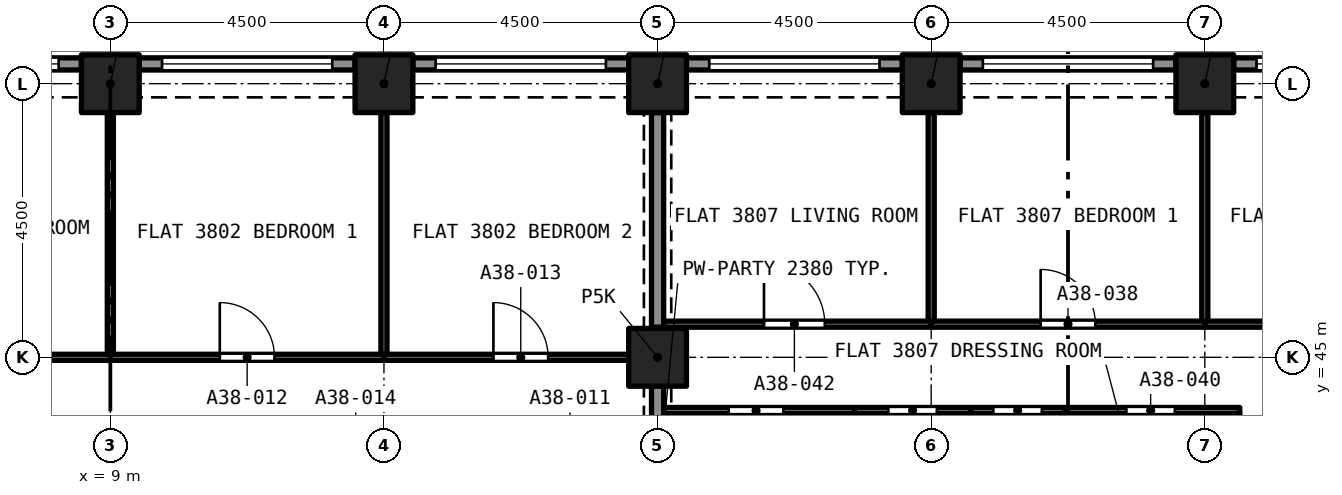
"""IFC4 building model, lengths in metres.
Left out: names, types, materials, properties, quantities, classifications, styles, units other than length and angle.
Written with IfcOpenShell. Run it as: python <this file> out.ifc"""

import sys

from ifc_helpers import new_model, si_unit, direction, frame, frame_2d, origin, origin_2d, place, context, subcontext, project, spatial, rectangle, extrude, element, fill, save


model = new_model("IFC4")
c1 = context("Model", 3, precision=1e-05, world=origin(), true_north=direction((0.0, 1.0)))
c2 = subcontext(c1, "Body", "Model", "MODEL_VIEW")
j1 = project(units=[si_unit("LENGTHUNIT", "METRE"), si_unit("PLANEANGLEUNIT", "RADIAN")], contexts=[c1])
p1 = place(None, origin())
s1 = spatial("IfcSite", under=j1, at=p1, CompositionType="ELEMENT")
p2 = place(p1, origin())
s2 = spatial("IfcBuilding", under=s1, at=p2, CompositionType="ELEMENT")
p3 = place(p2, frame((0.0, 0.0, 136.6)))
s3 = spatial("IfcBuildingStorey", under=s2, at=p3, CompositionType="ELEMENT", Elevation=136.6)
for number, where, z_axis, x_axis in (
    (1, (18.0, 45.0, 0.0), (0.0, 0.0, 1.0), (1.0, 0.0, 0.0)),
    (2, (9.0, 49.5, 0.0), (0.0, 0.0, 1.0), (1.0, 0.0, 0.0)),
    (3, (13.5, 49.5, 0.0), (0.0, 0.0, 1.0), (1.0, 0.0, 0.0)),
    (4, (18.0, 49.5, 0.0), (0.0, 0.0, 1.0), (1.0, 0.0, 0.0)),
    (5, (22.5, 49.5, 0.0), (0.0, 0.0, 1.0), (1.0, 0.0, 0.0)),
    (6, (27.0, 49.5, 0.0), (0.0, 0.0, 1.0), (1.0, 0.0, 0.0)),
):
    element("IfcColumn", number, at=place(p3, frame(where, z_axis=z_axis, x_axis=x_axis)), inside=s3, PredefinedType="COLUMN", context=c2, shape_type="SweptSolid", body=[
        extrude(rectangle(XDim=0.95, YDim=0.95, at=origin_2d()), origin(), (0.0, 0.0, 1.0), 3.2),
    ])
p4 = place(p3, frame((27.475, 49.825, 0.0), z_axis=(0.0, 0.0, 1.0), x_axis=(1.0, 0.0, 0.0)))
e7 = element("IfcWall", 7, at=p4, inside=s3, PredefinedType="SOLIDWALL", context=c2, shape_type="SweptSolid", body=[
    extrude(rectangle(XDim=3.55, YDim=0.2, at=frame_2d((1.775, 0.0))), origin(), (0.0, 0.0, 1.0), 3.2),
])
p5 = place(p4, frame((0.375, 0.0, 0.45)))
e8 = element("IfcOpeningElement", 8, at=p5, cuts=e7, PredefinedType="OPENING", context=c2, shape_type="SweptSolid", body=[
    extrude(rectangle(XDim=2.8, YDim=1.95, at=frame_2d((1.4, 0.975))), frame((0.0, 0.11, 0.0), z_axis=(0.0, -1.0, 0.0), x_axis=(1.0, 0.0, 0.0)), (0.0, 0.0, 1.0), 0.22),
])
p6 = place(p3, frame((22.975, 49.825, 0.0), z_axis=(0.0, 0.0, 1.0), x_axis=(1.0, 0.0, 0.0)))
e9 = element("IfcWall", 9, at=p6, inside=s3, PredefinedType="SOLIDWALL", context=c2, shape_type="SweptSolid", body=[
    extrude(rectangle(XDim=3.55, YDim=0.2, at=frame_2d((1.775, 0.0))), origin(), (0.0, 0.0, 1.0), 3.2),
])
p7 = place(p6, frame((0.375, 0.0, 0.45)))
e10 = element("IfcOpeningElement", 10, at=p7, cuts=e9, PredefinedType="OPENING", context=c2, shape_type="SweptSolid", body=[
    extrude(rectangle(XDim=2.8, YDim=1.95, at=frame_2d((1.4, 0.975))), frame((0.0, 0.11, 0.0), z_axis=(0.0, -1.0, 0.0), x_axis=(1.0, 0.0, 0.0)), (0.0, 0.0, 1.0), 0.22),
])
p8 = place(p3, frame((18.475, 49.825, 0.0), z_axis=(0.0, 0.0, 1.0), x_axis=(1.0, 0.0, 0.0)))
e11 = element("IfcWall", 11, at=p8, inside=s3, PredefinedType="SOLIDWALL", context=c2, shape_type="SweptSolid", body=[
    extrude(rectangle(XDim=3.55, YDim=0.2, at=frame_2d((1.775, 0.0))), origin(), (0.0, 0.0, 1.0), 3.2),
])
p9 = place(p8, frame((0.375, 0.0, 0.45)))
e12 = element("IfcOpeningElement", 12, at=p9, cuts=e11, PredefinedType="OPENING", context=c2, shape_type="SweptSolid", body=[
    extrude(rectangle(XDim=2.8, YDim=1.95, at=frame_2d((1.4, 0.975))), frame((0.0, 0.11, 0.0), z_axis=(0.0, -1.0, 0.0), x_axis=(1.0, 0.0, 0.0)), (0.0, 0.0, 1.0), 0.22),
])
p10 = place(p3, frame((13.975, 49.825, 0.0), z_axis=(0.0, 0.0, 1.0), x_axis=(1.0, 0.0, 0.0)))
e13 = element("IfcWall", 13, at=p10, inside=s3, PredefinedType="SOLIDWALL", context=c2, shape_type="SweptSolid", body=[
    extrude(rectangle(XDim=3.55, YDim=0.2, at=frame_2d((1.775, 0.0))), origin(), (0.0, 0.0, 1.0), 3.2),
])
p11 = place(p10, frame((0.375, 0.0, 0.45)))
e14 = element("IfcOpeningElement", 14, at=p11, cuts=e13, PredefinedType="OPENING", context=c2, shape_type="SweptSolid", body=[
    extrude(rectangle(XDim=2.8, YDim=1.95, at=frame_2d((1.4, 0.975))), frame((0.0, 0.11, 0.0), z_axis=(0.0, -1.0, 0.0), x_axis=(1.0, 0.0, 0.0)), (0.0, 0.0, 1.0), 0.22),
])
p12 = place(p3, frame((9.475, 49.825, 0.0), z_axis=(0.0, 0.0, 1.0), x_axis=(1.0, 0.0, 0.0)))
e15 = element("IfcWall", 15, at=p12, inside=s3, PredefinedType="SOLIDWALL", context=c2, shape_type="SweptSolid", body=[
    extrude(rectangle(XDim=3.55, YDim=0.2, at=frame_2d((1.775, 0.0))), origin(), (0.0, 0.0, 1.0), 3.2),
])
p13 = place(p12, frame((0.375, 0.0, 0.45)))
e16 = element("IfcOpeningElement", 16, at=p13, cuts=e15, PredefinedType="OPENING", context=c2, shape_type="SweptSolid", body=[
    extrude(rectangle(XDim=2.8, YDim=1.95, at=frame_2d((1.4, 0.975))), frame((0.0, 0.11, 0.0), z_axis=(0.0, -1.0, 0.0), x_axis=(1.0, 0.0, 0.0)), (0.0, 0.0, 1.0), 0.22),
])
p14 = place(p3, frame((4.975, 49.825, 0.0), z_axis=(0.0, 0.0, 1.0), x_axis=(1.0, 0.0, 0.0)))
e17 = element("IfcWall", 17, at=p14, inside=s3, PredefinedType="SOLIDWALL", context=c2, shape_type="SweptSolid", body=[
    extrude(rectangle(XDim=3.55, YDim=0.2, at=frame_2d((1.775, 0.0))), origin(), (0.0, 0.0, 1.0), 3.2),
])
p15 = place(p14, frame((0.375, 0.0, 0.45)))
e18 = element("IfcOpeningElement", 18, at=p15, cuts=e17, PredefinedType="OPENING", context=c2, shape_type="SweptSolid", body=[
    extrude(rectangle(XDim=2.8, YDim=1.95, at=frame_2d((1.4, 0.975))), frame((0.0, 0.11, 0.0), z_axis=(0.0, -1.0, 0.0), x_axis=(1.0, 0.0, 0.0)), (0.0, 0.0, 1.0), 0.22),
])
p16 = place(p3, frame((18.0, 40.975, 0.0), z_axis=(0.0, 0.0, 1.0), x_axis=(0.0, 1.0, 0.0)))
e19 = element("IfcWall", 19, at=p16, inside=s3, PredefinedType="PARTITIONING", context=c2, shape_type="SweptSolid", body=[
    extrude(rectangle(XDim=3.55, YDim=0.2, at=frame_2d((1.775, 0.0))), origin(), (0.0, 0.0, 1.0), 2.38),
])
p17 = place(p3, frame((13.5, 45.05, 0.0), z_axis=(0.0, 0.0, 1.0), x_axis=(0.0, 1.0, 0.0)))
e20 = element("IfcWall", 20, at=p17, inside=s3, PredefinedType="PARTITIONING", context=c2, shape_type="SweptSolid", body=[
    extrude(rectangle(XDim=3.975, YDim=0.1, at=frame_2d((1.987, 0.0))), origin(), (0.0, 0.0, 1.0), 2.9),
])
p18 = place(p3, frame((9.0, 45.0, 0.0), z_axis=(0.0, 0.0, 1.0), x_axis=(1.0, 0.0, 0.0)))
e21 = element("IfcWall", 21, at=p18, inside=s3, PredefinedType="PARTITIONING", context=c2, shape_type="SweptSolid", body=[
    extrude(rectangle(XDim=4.5, YDim=0.1, at=frame_2d((2.25, 0.0))), origin(), (0.0, 0.0, 1.0), 2.9),
])
p19 = place(p18, frame((1.8, 0.0, 0.0)))
e22 = element("IfcOpeningElement", 22, at=p19, cuts=e21, PredefinedType="OPENING", context=c2, shape_type="SweptSolid", body=[
    extrude(rectangle(XDim=0.9, YDim=2.1, at=frame_2d((0.45, 1.05))), frame((0.0, 0.06, 0.0), z_axis=(0.0, -1.0, 0.0), x_axis=(1.0, 0.0, 0.0)), (0.0, 0.0, 1.0), 0.12),
])
p20 = place(p3, frame((9.0, 45.05, 0.0), z_axis=(0.0, 0.0, 1.0), x_axis=(0.0, 1.0, 0.0)))
e23 = element("IfcWall", 23, at=p20, inside=s3, PredefinedType="PARTITIONING", context=c2, shape_type="SweptSolid", body=[
    extrude(rectangle(XDim=3.975, YDim=0.1, at=frame_2d((1.987, 0.0))), origin(), (0.0, 0.0, 1.0), 2.9),
])
p21 = place(p3, frame((13.5, 45.0, 0.0), z_axis=(0.0, 0.0, 1.0), x_axis=(1.0, 0.0, 0.0)))
e24 = element("IfcWall", 24, at=p21, inside=s3, PredefinedType="PARTITIONING", context=c2, shape_type="SweptSolid", body=[
    extrude(rectangle(XDim=4.025, YDim=0.1, at=frame_2d((2.012, 0.0))), origin(), (0.0, 0.0, 1.0), 2.9),
])
p22 = place(p21, frame((1.8, 0.0, 0.0)))
e25 = element("IfcOpeningElement", 25, at=p22, cuts=e24, PredefinedType="OPENING", context=c2, shape_type="SweptSolid", body=[
    extrude(rectangle(XDim=0.9, YDim=2.1, at=frame_2d((0.45, 1.05))), frame((0.0, 0.06, 0.0), z_axis=(0.0, -1.0, 0.0), x_axis=(1.0, 0.0, 0.0)), (0.0, 0.0, 1.0), 0.12),
])
p23 = place(p3, frame((18.0, 45.495, 0.0), z_axis=(0.0, 0.0, 1.0), x_axis=(0.0, 1.0, 0.0)))
e26 = element("IfcWall", 26, at=p23, inside=s3, PredefinedType="PARTITIONING", context=c2, shape_type="SweptSolid", body=[
    extrude(rectangle(XDim=3.53, YDim=0.2, at=frame_2d((1.765, 0.0))), origin(), (0.0, 0.0, 1.0), 2.38),
])
p24 = place(p3, frame((0.514, 45.0, 0.0), z_axis=(0.0, 0.0, 1.0), x_axis=(1.0, 0.0, 0.0)))
e27 = element("IfcWall", 27, at=p24, inside=s3, PredefinedType="PARTITIONING", context=c2, shape_type="SweptSolid", body=[
    extrude(rectangle(XDim=8.486, YDim=0.1, at=frame_2d((4.243, 0.0))), origin(), (0.0, 0.0, 1.0), 2.9),
])
p25 = place(p24, frame((3.423, 0.0, 0.0)))
e28 = element("IfcOpeningElement", 28, at=p25, cuts=e27, PredefinedType="OPENING", context=c2, shape_type="SweptSolid", body=[
    extrude(rectangle(XDim=1.6, YDim=2.1, at=frame_2d((0.8, 1.05))), frame((0.0, 0.06, 0.0), z_axis=(0.0, -1.0, 0.0), x_axis=(1.0, 0.0, 0.0)), (0.0, 0.0, 1.0), 0.12),
])
p26 = place(p3, frame((27.0, 45.595, 0.0), z_axis=(0.0, 0.0, 1.0), x_axis=(0.0, 1.0, 0.0)))
e29 = element("IfcWall", 29, at=p26, inside=s3, PredefinedType="PARTITIONING", context=c2, shape_type="SweptSolid", body=[
    extrude(rectangle(XDim=3.43, YDim=0.1, at=frame_2d((1.715, 0.0))), origin(), (0.0, 0.0, 1.0), 2.75),
])
p27 = place(p3, frame((22.5, 45.545, 0.0), z_axis=(0.0, 0.0, 1.0), x_axis=(1.0, 0.0, 0.0)))
e30 = element("IfcWall", 30, at=p27, inside=s3, PredefinedType="PARTITIONING", context=c2, shape_type="SweptSolid", body=[
    extrude(rectangle(XDim=4.5, YDim=0.1, at=frame_2d((2.25, 0.0))), origin(), (0.0, 0.0, 1.0), 2.75),
])
p28 = place(p27, frame((1.8, 0.0, 0.0)))
e31 = element("IfcOpeningElement", 31, at=p28, cuts=e30, PredefinedType="OPENING", context=c2, shape_type="SweptSolid", body=[
    extrude(rectangle(XDim=0.9, YDim=2.1, at=frame_2d((0.45, 1.05))), frame((0.0, 0.06, 0.0), z_axis=(0.0, -1.0, 0.0), x_axis=(1.0, 0.0, 0.0)), (0.0, 0.0, 1.0), 0.12),
])
p29 = place(p3, frame((22.5, 45.595, 0.0), z_axis=(0.0, 0.0, 1.0), x_axis=(0.0, 1.0, 0.0)))
e32 = element("IfcWall", 32, at=p29, inside=s3, PredefinedType="PARTITIONING", context=c2, shape_type="SweptSolid", body=[
    extrude(rectangle(XDim=3.43, YDim=0.1, at=frame_2d((1.715, 0.0))), origin(), (0.0, 0.0, 1.0), 2.75),
])
p30 = place(p3, frame((27.0, 45.545, 0.0), z_axis=(0.0, 0.0, 1.0), x_axis=(1.0, 0.0, 0.0)))
e33 = element("IfcWall", 33, at=p30, inside=s3, PredefinedType="PARTITIONING", context=c2, shape_type="SweptSolid", body=[
    extrude(rectangle(XDim=4.4, YDim=0.1, at=frame_2d((2.2, 0.0))), origin(), (0.0, 0.0, 1.0), 2.75),
])
p31 = place(p30, frame((1.8, 0.0, 0.0)))
e34 = element("IfcOpeningElement", 34, at=p31, cuts=e33, PredefinedType="OPENING", context=c2, shape_type="SweptSolid", body=[
    extrude(rectangle(XDim=0.9, YDim=2.1, at=frame_2d((0.45, 1.05))), frame((0.0, 0.06, 0.0), z_axis=(0.0, -1.0, 0.0), x_axis=(1.0, 0.0, 0.0)), (0.0, 0.0, 1.0), 0.12),
])
p32 = place(p3, frame((27.575, 44.125, 0.0), z_axis=(0.0, 0.0, 1.0), x_axis=(-1.0, 0.0, 0.0)))
e35 = element("IfcWall", 35, at=p32, inside=s3, PredefinedType="PARTITIONING", context=c2, shape_type="SweptSolid", body=[
    extrude(rectangle(XDim=2.881, YDim=0.1, at=frame_2d((1.44, 0.0))), origin(), (0.0, 0.0, 1.0), 2.75),
])
p33 = place(p32, frame((1.066, 0.0, 0.0)))
e36 = element("IfcOpeningElement", 36, at=p33, cuts=e35, PredefinedType="OPENING", context=c2, shape_type="SweptSolid", body=[
    extrude(rectangle(XDim=0.8, YDim=2.1, at=frame_2d((0.4, 1.05))), frame((0.0, 0.06, 0.0), z_axis=(0.0, -1.0, 0.0), x_axis=(1.0, 0.0, 0.0)), (0.0, 0.0, 1.0), 0.12),
])
for number, where, z_axis, x_axis in (
    (37, (27.525, 40.1, 0.0), (0.0, 0.0, 1.0), (0.0, 1.0, 0.0)),
    (38, (24.694, 40.1, 0.0), (0.0, 0.0, 1.0), (0.0, 1.0, 0.0)),
):
    element("IfcWall", number, at=place(p3, frame(where, z_axis=z_axis, x_axis=x_axis)), inside=s3, PredefinedType="PARTITIONING", context=c2, shape_type="SweptSolid", body=[
        extrude(rectangle(XDim=3.975, YDim=0.1, at=frame_2d((1.987, 0.0))), origin(), (0.0, 0.0, 1.0), 2.75),
    ])
p34 = place(p3, frame((21.24, 44.125, 0.0), z_axis=(0.0, 0.0, 1.0), x_axis=(-1.0, 0.0, 0.0)))
e39 = element("IfcWall", 39, at=p34, inside=s3, PredefinedType="PARTITIONING", context=c2, shape_type="SweptSolid", body=[
    extrude(rectangle(XDim=3.14, YDim=0.1, at=frame_2d((1.57, 0.0))), origin(), (0.0, 0.0, 1.0), 2.75),
])
p35 = place(p34, frame((1.17, 0.0, 0.0)))
e40 = element("IfcOpeningElement", 40, at=p35, cuts=e39, PredefinedType="OPENING", context=c2, shape_type="SweptSolid", body=[
    extrude(rectangle(XDim=0.9, YDim=2.1, at=frame_2d((0.45, 1.05))), frame((0.0, 0.06, 0.0), z_axis=(0.0, -1.0, 0.0), x_axis=(1.0, 0.0, 0.0)), (0.0, 0.0, 1.0), 0.12),
])
p36 = place(p3, frame((18.1, 45.545, 0.0), z_axis=(0.0, 0.0, 1.0), x_axis=(1.0, 0.0, 0.0)))
e41 = element("IfcWall", 41, at=p36, inside=s3, PredefinedType="PARTITIONING", context=c2, shape_type="SweptSolid", body=[
    extrude(rectangle(XDim=4.4, YDim=0.1, at=frame_2d((2.2, 0.0))), origin(), (0.0, 0.0, 1.0), 2.75),
])
p37 = place(p36, frame((1.65, 0.0, 0.0)))
e42 = element("IfcOpeningElement", 42, at=p37, cuts=e41, PredefinedType="OPENING", context=c2, shape_type="SweptSolid", body=[
    extrude(rectangle(XDim=1.0, YDim=2.1, at=frame_2d((0.5, 1.05))), frame((0.0, 0.06, 0.0), z_axis=(0.0, -1.0, 0.0), x_axis=(1.0, 0.0, 0.0)), (0.0, 0.0, 1.0), 0.12),
])
p38 = place(p3, frame((24.694, 44.125, 0.0), z_axis=(0.0, 0.0, 1.0), x_axis=(-1.0, 0.0, 0.0)))
e43 = element("IfcWall", 43, at=p38, inside=s3, PredefinedType="PARTITIONING", context=c2, shape_type="SweptSolid", body=[
    extrude(rectangle(XDim=1.544, YDim=0.1, at=frame_2d((0.772, 0.0))), origin(), (0.0, 0.0, 1.0), 2.75),
])
p39 = place(p38, frame((0.372, 0.0, 0.0)))
e44 = element("IfcOpeningElement", 44, at=p39, cuts=e43, PredefinedType="OPENING", context=c2, shape_type="SweptSolid", body=[
    extrude(rectangle(XDim=0.8, YDim=2.1, at=frame_2d((0.4, 1.05))), frame((0.0, 0.06, 0.0), z_axis=(0.0, -1.0, 0.0), x_axis=(1.0, 0.0, 0.0)), (0.0, 0.0, 1.0), 0.12),
])
p40 = place(p3, frame((23.15, 44.125, 0.0), z_axis=(0.0, 0.0, 1.0), x_axis=(-1.0, 0.0, 0.0)))
e45 = element("IfcWall", 45, at=p40, inside=s3, PredefinedType="PARTITIONING", context=c2, shape_type="SweptSolid", body=[
    extrude(rectangle(XDim=1.91, YDim=0.1, at=frame_2d((0.955, 0.0))), origin(), (0.0, 0.0, 1.0), 2.75),
])
p41 = place(p40, frame((0.555, 0.0, 0.0)))
e46 = element("IfcOpeningElement", 46, at=p41, cuts=e45, PredefinedType="OPENING", context=c2, shape_type="SweptSolid", body=[
    extrude(rectangle(XDim=0.8, YDim=2.1, at=frame_2d((0.4, 1.05))), frame((0.0, 0.06, 0.0), z_axis=(0.0, -1.0, 0.0), x_axis=(1.0, 0.0, 0.0)), (0.0, 0.0, 1.0), 0.12),
])
for number, where, z_axis, x_axis in (
    (47, (21.24, 40.1, 0.0), (0.0, 0.0, 1.0), (0.0, 1.0, 0.0)),
    (48, (23.15, 40.1, 0.0), (0.0, 0.0, 1.0), (0.0, 1.0, 0.0)),
):
    element("IfcWall", number, at=place(p3, frame(where, z_axis=z_axis, x_axis=x_axis)), inside=s3, PredefinedType="PARTITIONING", context=c2, shape_type="SweptSolid", body=[
        extrude(rectangle(XDim=3.975, YDim=0.1, at=frame_2d((1.987, 0.0))), origin(), (0.0, 0.0, 1.0), 2.75),
    ])
p42 = place(p5, origin())
e49 = element("IfcWindow", 49, at=p42, inside=s3, PartitioningType="SINGLE_PANEL", PredefinedType="WINDOW", context=c2, shape_type="SweptSolid", body=[
    extrude(rectangle(XDim=2.8, YDim=1.95, at=frame_2d((1.4, 0.975))), frame((0.0, 0.03, 0.0), z_axis=(0.0, -1.0, 0.0), x_axis=(1.0, 0.0, 0.0)), (0.0, 0.0, 1.0), 0.06),
])
fill(e8, e49)
p43 = place(p7, origin())
e50 = element("IfcWindow", 50, at=p43, inside=s3, PartitioningType="SINGLE_PANEL", PredefinedType="WINDOW", context=c2, shape_type="SweptSolid", body=[
    extrude(rectangle(XDim=2.8, YDim=1.95, at=frame_2d((1.4, 0.975))), frame((0.0, 0.03, 0.0), z_axis=(0.0, -1.0, 0.0), x_axis=(1.0, 0.0, 0.0)), (0.0, 0.0, 1.0), 0.06),
])
fill(e10, e50)
p44 = place(p9, origin())
e51 = element("IfcWindow", 51, at=p44, inside=s3, PartitioningType="SINGLE_PANEL", PredefinedType="WINDOW", context=c2, shape_type="SweptSolid", body=[
    extrude(rectangle(XDim=2.8, YDim=1.95, at=frame_2d((1.4, 0.975))), frame((0.0, 0.03, 0.0), z_axis=(0.0, -1.0, 0.0), x_axis=(1.0, 0.0, 0.0)), (0.0, 0.0, 1.0), 0.06),
])
fill(e12, e51)
p45 = place(p11, origin())
e52 = element("IfcWindow", 52, at=p45, inside=s3, PartitioningType="SINGLE_PANEL", PredefinedType="WINDOW", context=c2, shape_type="SweptSolid", body=[
    extrude(rectangle(XDim=2.8, YDim=1.95, at=frame_2d((1.4, 0.975))), frame((0.0, 0.03, 0.0), z_axis=(0.0, -1.0, 0.0), x_axis=(1.0, 0.0, 0.0)), (0.0, 0.0, 1.0), 0.06),
])
fill(e14, e52)
p46 = place(p13, origin())
e53 = element("IfcWindow", 53, at=p46, inside=s3, PartitioningType="SINGLE_PANEL", PredefinedType="WINDOW", context=c2, shape_type="SweptSolid", body=[
    extrude(rectangle(XDim=2.8, YDim=1.95, at=frame_2d((1.4, 0.975))), frame((0.0, 0.03, 0.0), z_axis=(0.0, -1.0, 0.0), x_axis=(1.0, 0.0, 0.0)), (0.0, 0.0, 1.0), 0.06),
])
fill(e16, e53)
p47 = place(p15, origin())
e54 = element("IfcWindow", 54, at=p47, inside=s3, PartitioningType="SINGLE_PANEL", PredefinedType="WINDOW", context=c2, shape_type="SweptSolid", body=[
    extrude(rectangle(XDim=2.8, YDim=1.95, at=frame_2d((1.4, 0.975))), frame((0.0, 0.03, 0.0), z_axis=(0.0, -1.0, 0.0), x_axis=(1.0, 0.0, 0.0)), (0.0, 0.0, 1.0), 0.06),
])
fill(e18, e54)
p48 = place(p19, origin())
e55 = element("IfcDoor", 55, at=p48, inside=s3, OperationType="SINGLE_SWING_LEFT", PredefinedType="DOOR", context=c2, shape_type="SweptSolid", body=[
    extrude(rectangle(XDim=0.9, YDim=2.1, at=frame_2d((0.45, 1.05))), frame((0.0, 0.025, 0.0), z_axis=(0.0, -1.0, 0.0), x_axis=(1.0, 0.0, 0.0)), (0.0, 0.0, 1.0), 0.05),
])
fill(e22, e55)
p49 = place(p22, origin())
e56 = element("IfcDoor", 56, at=p49, inside=s3, OperationType="SINGLE_SWING_RIGHT", PredefinedType="DOOR", context=c2, shape_type="SweptSolid", body=[
    extrude(rectangle(XDim=0.9, YDim=2.1, at=frame_2d((0.45, 1.05))), frame((0.0, 0.025, 0.0), z_axis=(0.0, -1.0, 0.0), x_axis=(1.0, 0.0, 0.0)), (0.0, 0.0, 1.0), 0.05),
])
fill(e25, e56)
p50 = place(p28, origin())
e57 = element("IfcDoor", 57, at=p50, inside=s3, OperationType="SINGLE_SWING_LEFT", PredefinedType="DOOR", context=c2, shape_type="SweptSolid", body=[
    extrude(rectangle(XDim=0.9, YDim=2.1, at=frame_2d((0.45, 1.05))), frame((0.0, 0.025, 0.0), z_axis=(0.0, -1.0, 0.0), x_axis=(1.0, 0.0, 0.0)), (0.0, 0.0, 1.0), 0.05),
])
fill(e31, e57)
p51 = place(p33, origin())
e58 = element("IfcDoor", 58, at=p51, inside=s3, OperationType="SINGLE_SWING_RIGHT", PredefinedType="DOOR", context=c2, shape_type="SweptSolid", body=[
    extrude(rectangle(XDim=0.8, YDim=2.1, at=frame_2d((0.4, 1.05))), frame((0.0, 0.025, 0.0), z_axis=(0.0, -1.0, 0.0), x_axis=(1.0, 0.0, 0.0)), (0.0, 0.0, 1.0), 0.05),
])
fill(e36, e58)
p52 = place(p35, origin())
e59 = element("IfcDoor", 59, at=p52, inside=s3, OperationType="SINGLE_SWING_RIGHT", PredefinedType="DOOR", context=c2, shape_type="SweptSolid", body=[
    extrude(rectangle(XDim=0.9, YDim=2.1, at=frame_2d((0.45, 1.05))), frame((0.0, 0.025, 0.0), z_axis=(0.0, -1.0, 0.0), x_axis=(1.0, 0.0, 0.0)), (0.0, 0.0, 1.0), 0.05),
])
fill(e40, e59)
p53 = place(p37, origin())
e60 = element("IfcDoor", 60, at=p53, inside=s3, OperationType="SINGLE_SWING_LEFT", PredefinedType="DOOR", context=c2, shape_type="SweptSolid", body=[
    extrude(rectangle(XDim=1.0, YDim=2.1, at=frame_2d((0.5, 1.05))), frame((0.0, 0.025, 0.0), z_axis=(0.0, -1.0, 0.0), x_axis=(1.0, 0.0, 0.0)), (0.0, 0.0, 1.0), 0.05),
])
fill(e42, e60)
p54 = place(p39, origin())
e61 = element("IfcDoor", 61, at=p54, inside=s3, OperationType="SINGLE_SWING_LEFT", PredefinedType="DOOR", context=c2, shape_type="SweptSolid", body=[
    extrude(rectangle(XDim=0.8, YDim=2.1, at=frame_2d((0.4, 1.05))), frame((0.0, 0.025, 0.0), z_axis=(0.0, -1.0, 0.0), x_axis=(1.0, 0.0, 0.0)), (0.0, 0.0, 1.0), 0.05),
])
fill(e44, e61)
p55 = place(p41, origin())
e62 = element("IfcDoor", 62, at=p55, inside=s3, OperationType="SINGLE_SWING_LEFT", PredefinedType="DOOR", context=c2, shape_type="SweptSolid", body=[
    extrude(rectangle(XDim=0.8, YDim=2.1, at=frame_2d((0.4, 1.05))), frame((0.0, 0.025, 0.0), z_axis=(0.0, -1.0, 0.0), x_axis=(1.0, 0.0, 0.0)), (0.0, 0.0, 1.0), 0.05),
])
fill(e46, e62)
save(model, sys.argv[1])
